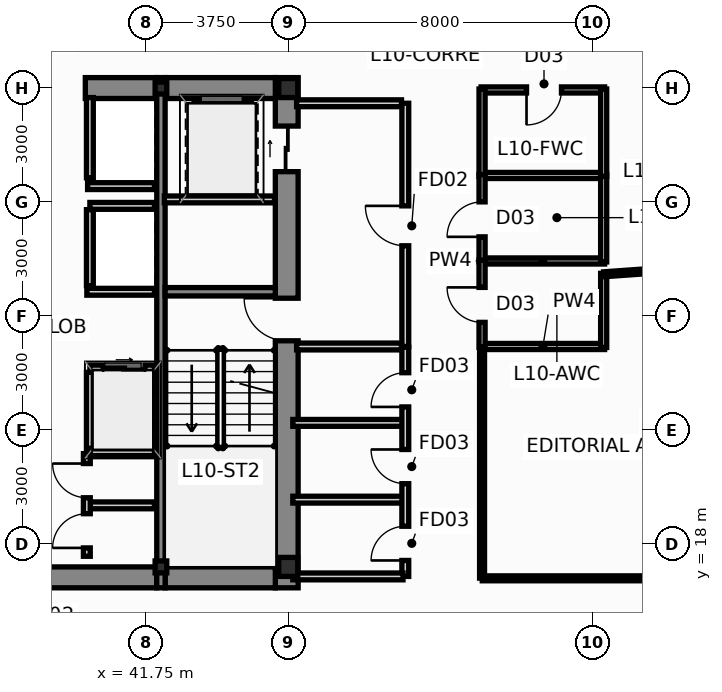
"""IFC4 building model, lengths in metres.
Left out: names, types, materials, properties, quantities, classifications, styles, units other than length and angle.
Written with IfcOpenShell. Run it as: python <this file> out.ifc"""

import sys

from ifc_helpers import new_model, si_unit, direction, frame, frame_2d, origin, origin_2d, place, context, subcontext, project, spatial, rectangle, i_section, extrude, source, transform, mapped, element, fill, save


model = new_model("IFC4")
c1 = context("Model", 3, precision=1e-05, world=origin(), true_north=direction((0.0, 1.0)))
c2 = subcontext(c1, "Body", "Model", "MODEL_VIEW")
j1 = project(units=[si_unit("LENGTHUNIT", "METRE"), si_unit("PLANEANGLEUNIT", "RADIAN")], contexts=[c1])
p1 = place(None, origin())
s1 = spatial("IfcSite", under=j1, at=p1, CompositionType="ELEMENT")
p2 = place(p1, origin())
s2 = spatial("IfcBuilding", under=s1, at=p2, CompositionType="ELEMENT")
p3 = place(p2, frame((0.0, 0.0, 42.2)))
s3 = spatial("IfcBuildingStorey", under=s2, at=p3, CompositionType="ELEMENT", Elevation=42.2)
m1 = source(origin(), c2, "Body", "SweptSolid", [
    extrude(i_section(OverallWidth=0.5, OverallDepth=0.5, WebThickness=0.028, FlangeThickness=0.04, at=origin_2d()), origin(), (0.0, 0.0, 1.0), 3.65),
])
for number, where, z_axis, x_axis in (
    (1, (45.5, 17.4, 0.0), (0.0, 0.0, 1.0), (1.0, 0.0, 0.0)),
    (2, (45.5, 30.0, 0.0), (0.0, 0.0, 1.0), (1.0, 0.0, 0.0)),
):
    element("IfcColumn", number, at=place(p3, frame(where, z_axis=z_axis, x_axis=x_axis)), inside=s3, PredefinedType="COLUMN", context=c2, shape_type="MappedRepresentation", body=[
        mapped(m1, transform((0.0, 0.0, 0.0), scale=1.0)),
    ])
m2 = source(origin(), c2, "Body", "SweptSolid", [
    extrude(i_section(OverallWidth=0.307, OverallDepth=0.315, WebThickness=0.012, FlangeThickness=0.019, at=origin_2d()), origin(), (0.0, 0.0, 1.0), 3.65),
])
for number, where, z_axis, x_axis in (
    (3, (42.15, 17.4, 0.0), (0.0, 0.0, 1.0), (1.0, 0.0, 0.0)),
    (4, (42.15, 30.0, 0.0), (0.0, 0.0, 1.0), (1.0, 0.0, 0.0)),
):
    element("IfcColumn", number, at=place(p3, frame(where, z_axis=z_axis, x_axis=x_axis)), inside=s3, PredefinedType="COLUMN", context=c2, shape_type="MappedRepresentation", body=[
        mapped(m2, transform((0.0, 0.0, 0.0), scale=1.0)),
    ])
p4 = place(p3, frame((45.46, 16.85, 0.0), z_axis=(0.0, 0.0, 1.0), x_axis=(0.0, 1.0, 0.0)))
e5 = element("IfcWall", 5, at=p4, inside=s3, PredefinedType="SHEAR", context=c2, shape_type="SweptSolid", body=[
    extrude(rectangle(XDim=13.425, YDim=0.6, at=frame_2d((6.712, 0.0))), origin(), (0.0, 0.0, 1.0), 3.65),
])
p5 = place(p4, frame((6.5, 0.0, 0.0)))
e6 = element("IfcOpeningElement", 6, at=p5, cuts=e5, PredefinedType="OPENING", context=c2, shape_type="SweptSolid", body=[
    extrude(rectangle(XDim=1.12, YDim=2.15, at=frame_2d((0.56, 1.075))), frame((0.0, 0.312, 0.0), z_axis=(0.0, -1.0, 0.0), x_axis=(1.0, 0.0, 0.0)), (0.0, 0.0, 1.0), 0.624),
])
p6 = place(p4, frame((10.95, 0.0, 0.0)))
e7 = element("IfcOpeningElement", 7, at=p6, cuts=e5, PredefinedType="OPENING", context=c2, shape_type="SweptSolid", body=[
    extrude(rectangle(XDim=1.2, YDim=2.2, at=frame_2d((0.6, 1.1))), frame((0.0, 0.312, 0.0), z_axis=(0.0, -1.0, 0.0), x_axis=(1.0, 0.0, 0.0)), (0.0, 0.0, 1.0), 0.624),
])
p7 = place(p3, frame((33.96, 17.125, 0.0), z_axis=(0.0, 0.0, 1.0), x_axis=(1.0, 0.0, 0.0)))
e8 = element("IfcWall", 8, at=p7, inside=s3, PredefinedType="SHEAR", context=c2, shape_type="SweptSolid", body=[
    extrude(rectangle(XDim=8.08, YDim=0.55, at=frame_2d((4.04, 0.0))), origin(), (0.0, 0.0, 1.0), 3.65),
])
p8 = place(p3, frame((42.26, 17.125, 0.0), z_axis=(0.0, 0.0, 1.0), x_axis=(1.0, 0.0, 0.0)))
e9 = element("IfcWall", 9, at=p8, inside=s3, PredefinedType="SHEAR", context=c2, shape_type="SweptSolid", body=[
    extrude(rectangle(XDim=2.9, YDim=0.55, at=frame_2d((1.45, 0.0))), origin(), (0.0, 0.0, 1.0), 3.65),
])
p9 = place(p3, frame((40.16, 30.0, 0.0), z_axis=(0.0, 0.0, 1.0), x_axis=(1.0, 0.0, 0.0)))
e10 = element("IfcWall", 10, at=p9, inside=s3, PredefinedType="SHEAR", context=c2, shape_type="SweptSolid", body=[
    extrude(rectangle(XDim=1.88, YDim=0.55, at=frame_2d((0.94, 0.0))), origin(), (0.0, 0.0, 1.0), 3.65),
])
p10 = place(p3, frame((42.26, 30.0, 0.0), z_axis=(0.0, 0.0, 1.0), x_axis=(1.0, 0.0, 0.0)))
e11 = element("IfcWall", 11, at=p10, inside=s3, PredefinedType="SHEAR", context=c2, shape_type="SweptSolid", body=[
    extrude(rectangle(XDim=2.9, YDim=0.55, at=frame_2d((1.45, 0.0))), origin(), (0.0, 0.0, 1.0), 3.65),
])
p11 = place(p3, frame((42.15, 16.85, 0.0), z_axis=(0.0, 0.0, 1.0), x_axis=(0.0, 1.0, 0.0)))
e12 = element("IfcWall", 12, at=p11, inside=s3, PredefinedType="SHEAR", context=c2, shape_type="SweptSolid", body=[
    extrude(rectangle(XDim=13.425, YDim=0.22, at=frame_2d((6.712, 0.0))), origin(), (0.0, 0.0, 1.0), 3.65),
])
p12 = place(p3, frame((42.26, 24.64, 0.0), z_axis=(0.0, 0.0, 1.0), x_axis=(1.0, 0.0, 0.0)))
e13 = element("IfcWall", 13, at=p12, inside=s3, PredefinedType="SHEAR", context=c2, shape_type="SweptSolid", body=[
    extrude(rectangle(XDim=2.9, YDim=0.22, at=frame_2d((1.45, 0.0))), origin(), (0.0, 0.0, 1.0), 3.65),
])
p13 = place(p3, frame((40.28, 22.62, 0.0), z_axis=(0.0, 0.0, 1.0), x_axis=(1.0, 0.0, 0.0)))
e14 = element("IfcWall", 14, at=p13, inside=s3, PredefinedType="PARTITIONING", context=c2, shape_type="SweptSolid", body=[
    extrude(rectangle(XDim=1.7, YDim=0.18, at=frame_2d((0.85, 0.0))), origin(), (0.0, 0.0, 1.0), 3.4),
])
p14 = place(p13, frame((0.35, 0.0, 0.0)))
e15 = element("IfcOpeningElement", 15, at=p14, cuts=e14, PredefinedType="OPENING", context=c2, shape_type="SweptSolid", body=[
    extrude(rectangle(XDim=1.1, YDim=2.2, at=frame_2d((0.55, 1.1))), frame((0.0, 0.102, 0.0), z_axis=(0.0, -1.0, 0.0), x_axis=(1.0, 0.0, 0.0)), (0.0, 0.0, 1.0), 0.204),
])
p15 = place(p3, frame((40.28, 20.52, 0.0), z_axis=(0.0, 0.0, 1.0), x_axis=(0.0, 1.0, 0.0)))
e16 = element("IfcWall", 16, at=p15, inside=s3, PredefinedType="PARTITIONING", context=c2, shape_type="SweptSolid", body=[
    extrude(rectangle(XDim=2.0, YDim=0.18, at=frame_2d((1.0, 0.0))), origin(), (0.0, 0.0, 1.0), 3.4),
])
p16 = place(p3, frame((40.28, 26.9, 0.0), z_axis=(0.0, 0.0, 1.0), x_axis=(1.0, 0.0, 0.0)))
e17 = element("IfcWall", 17, at=p16, inside=s3, PredefinedType="PARTITIONING", context=c2, shape_type="SweptSolid", body=[
    extrude(rectangle(XDim=1.7, YDim=0.18, at=frame_2d((0.85, 0.0))), origin(), (0.0, 0.0, 1.0), 3.4),
])
p17 = place(p3, frame((40.28, 24.8, 0.0), z_axis=(0.0, 0.0, 1.0), x_axis=(0.0, 1.0, 0.0)))
e18 = element("IfcWall", 18, at=p17, inside=s3, PredefinedType="PARTITIONING", context=c2, shape_type="SweptSolid", body=[
    extrude(rectangle(XDim=2.0, YDim=0.18, at=frame_2d((1.0, 0.0))), origin(), (0.0, 0.0, 1.0), 3.4),
])
p18 = place(p3, frame((40.2, 24.64, 0.0), z_axis=(0.0, 0.0, 1.0), x_axis=(1.0, 0.0, 0.0)))
e19 = element("IfcWall", 19, at=p18, inside=s3, PredefinedType="PARTITIONING", context=c2, shape_type="SweptSolid", body=[
    extrude(rectangle(XDim=1.78, YDim=0.18, at=frame_2d((0.89, 0.0))), origin(), (0.0, 0.0, 1.0), 3.4),
])
p19 = place(p3, frame((40.22, 27.42, 0.0), z_axis=(0.0, 0.0, 1.0), x_axis=(1.0, 0.0, 0.0)))
e20 = element("IfcWall", 20, at=p19, inside=s3, PredefinedType="PARTITIONING", context=c2, shape_type="SweptSolid", body=[
    extrude(rectangle(XDim=1.76, YDim=0.18, at=frame_2d((0.88, 0.0))), origin(), (0.0, 0.0, 1.0), 3.4),
])
p20 = place(p3, frame((40.28, 27.64, 0.0), z_axis=(0.0, 0.0, 1.0), x_axis=(0.0, 1.0, 0.0)))
e21 = element("IfcWall", 21, at=p20, inside=s3, PredefinedType="PARTITIONING", context=c2, shape_type="SweptSolid", body=[
    extrude(rectangle(XDim=2.11, YDim=0.18, at=frame_2d((1.055, 0.0))), origin(), (0.0, 0.0, 1.0), 3.4),
])
p21 = place(p3, frame((48.58, 23.2, 0.0), z_axis=(0.0, 0.0, 1.0), x_axis=(0.0, 1.0, 0.0)))
e22 = element("IfcWall", 22, at=p21, inside=s3, PredefinedType="PARTITIONING", context=c2, shape_type="SweptSolid", body=[
    extrude(rectangle(XDim=6.4, YDim=0.18, at=frame_2d((3.2, 0.0))), origin(), (0.0, 0.0, 1.0), 3.4),
])
p22 = place(p21, frame((2.65, 0.0, 0.0)))
e23 = element("IfcOpeningElement", 23, at=p22, cuts=e22, PredefinedType="OPENING", context=c2, shape_type="SweptSolid", body=[
    extrude(rectangle(XDim=1.05, YDim=2.15, at=frame_2d((0.525, 1.075))), frame((0.0, 0.102, 0.0), z_axis=(0.0, -1.0, 0.0), x_axis=(1.0, 0.0, 0.0)), (0.0, 0.0, 1.0), 0.204),
])
p23 = place(p3, frame((45.72, 23.2, 0.0), z_axis=(0.0, 0.0, 1.0), x_axis=(1.0, 0.0, 0.0)))
e24 = element("IfcWall", 24, at=p23, inside=s3, PredefinedType="PARTITIONING", context=c2, shape_type="SweptSolid", body=[
    extrude(rectangle(XDim=2.76, YDim=0.18, at=frame_2d((1.38, 0.0))), origin(), (0.0, 0.0, 1.0), 3.4),
])
p24 = place(p3, frame((45.72, 29.6, 0.0), z_axis=(0.0, 0.0, 1.0), x_axis=(1.0, 0.0, 0.0)))
e25 = element("IfcWall", 25, at=p24, inside=s3, PredefinedType="PARTITIONING", context=c2, shape_type="SweptSolid", body=[
    extrude(rectangle(XDim=2.76, YDim=0.18, at=frame_2d((1.38, 0.0))), origin(), (0.0, 0.0, 1.0), 2.783),
])
p25 = place(p3, frame((42.24, 27.07, 0.0), z_axis=(0.0, 0.0, 1.0), x_axis=(1.0, 0.0, 0.0)))
e26 = element("IfcWall", 26, at=p25, inside=s3, PredefinedType="PARTITIONING", context=c2, shape_type="SweptSolid", body=[
    extrude(rectangle(XDim=2.9, YDim=0.18, at=frame_2d((1.45, 0.0))), origin(), (0.0, 0.0, 1.0), 3.4),
])
p26 = place(p3, frame((40.22, 20.42, 0.0), z_axis=(0.0, 0.0, 1.0), x_axis=(1.0, 0.0, 0.0)))
e27 = element("IfcWall", 27, at=p26, inside=s3, PredefinedType="PARTITIONING", context=c2, shape_type="SweptSolid", body=[
    extrude(rectangle(XDim=1.76, YDim=0.18, at=frame_2d((0.88, 0.0))), origin(), (0.0, 0.0, 1.0), 3.4),
])
p27 = place(p3, frame((40.28, 19.02, 0.0), z_axis=(0.0, 0.0, 1.0), x_axis=(1.0, 0.0, 0.0)))
e28 = element("IfcWall", 28, at=p27, inside=s3, PredefinedType="PARTITIONING", context=c2, shape_type="SweptSolid", body=[
    extrude(rectangle(XDim=1.7, YDim=0.18, at=frame_2d((0.85, 0.0))), origin(), (0.0, 0.0, 1.0), 3.4),
])
p28 = place(p3, frame((40.2, 17.68, 0.0), z_axis=(0.0, 0.0, 1.0), x_axis=(0.0, 1.0, 0.0)))
e29 = element("IfcWall", 29, at=p28, inside=s3, PredefinedType="PARTITIONING", context=c2, shape_type="SweptSolid", body=[
    extrude(rectangle(XDim=2.7, YDim=0.18, at=frame_2d((1.35, 0.0))), origin(), (0.0, 0.0, 1.0), 3.4),
])
p29 = place(p28, frame((0.22, 0.0, 0.0)))
e30 = element("IfcOpeningElement", 30, at=p29, cuts=e29, PredefinedType="OPENING", context=c2, shape_type="SweptSolid", body=[
    extrude(rectangle(XDim=0.9, YDim=2.1, at=frame_2d((0.45, 1.05))), frame((0.0, 0.102, 0.0), z_axis=(0.0, -1.0, 0.0), x_axis=(1.0, 0.0, 0.0)), (0.0, 0.0, 1.0), 0.204),
])
p30 = place(p28, frame((1.54, 0.0, 0.0)))
e31 = element("IfcOpeningElement", 31, at=p30, cuts=e29, PredefinedType="OPENING", context=c2, shape_type="SweptSolid", body=[
    extrude(rectangle(XDim=0.9, YDim=2.1, at=frame_2d((0.45, 1.05))), frame((0.0, 0.102, 0.0), z_axis=(0.0, -1.0, 0.0), x_axis=(1.0, 0.0, 0.0)), (0.0, 0.0, 1.0), 0.204),
])
for number, where, z_axis, x_axis in (
    (32, (45.62, 19.17, 0.0), (0.0, 0.0, 1.0), (1.0, 0.0, 0.0)),
    (33, (45.62, 21.19, 0.0), (0.0, 0.0, 1.0), (1.0, 0.0, 0.0)),
):
    element("IfcWall", number, at=place(p3, frame(where, z_axis=z_axis, x_axis=x_axis)), inside=s3, PredefinedType="PARTITIONING", context=c2, shape_type="SweptSolid", body=[
        extrude(rectangle(XDim=2.9, YDim=0.18, at=frame_2d((1.45, 0.0))), origin(), (0.0, 0.0, 1.0), 3.4),
    ])
p31 = place(p3, frame((48.58, 17.15, 0.0), z_axis=(0.0, 0.0, 1.0), x_axis=(0.0, 1.0, 0.0)))
e34 = element("IfcWall", 34, at=p31, inside=s3, PredefinedType="PARTITIONING", context=c2, shape_type="SweptSolid", body=[
    extrude(rectangle(XDim=6.03, YDim=0.18, at=frame_2d((3.015, 0.0))), origin(), (0.0, 0.0, 1.0), 3.026),
])
p32 = place(p31, frame((0.42, 0.0, 0.0)))
e35 = element("IfcOpeningElement", 35, at=p32, cuts=e34, PredefinedType="OPENING", context=c2, shape_type="SweptSolid", body=[
    extrude(rectangle(XDim=0.9, YDim=2.1, at=frame_2d((0.45, 1.05))), frame((0.0, 0.102, 0.0), z_axis=(0.0, -1.0, 0.0), x_axis=(1.0, 0.0, 0.0)), (0.0, 0.0, 1.0), 0.204),
])
p33 = place(p31, frame((2.44, 0.0, 0.0)))
e36 = element("IfcOpeningElement", 36, at=p33, cuts=e34, PredefinedType="OPENING", context=c2, shape_type="SweptSolid", body=[
    extrude(rectangle(XDim=0.9, YDim=2.1, at=frame_2d((0.45, 1.05))), frame((0.0, 0.102, 0.0), z_axis=(0.0, -1.0, 0.0), x_axis=(1.0, 0.0, 0.0)), (0.0, 0.0, 1.0), 0.204),
])
p34 = place(p31, frame((4.46, 0.0, 0.0)))
e37 = element("IfcOpeningElement", 37, at=p34, cuts=e34, PredefinedType="OPENING", context=c2, shape_type="SweptSolid", body=[
    extrude(rectangle(XDim=0.9, YDim=2.1, at=frame_2d((0.45, 1.05))), frame((0.0, 0.102, 0.0), z_axis=(0.0, -1.0, 0.0), x_axis=(1.0, 0.0, 0.0)), (0.0, 0.0, 1.0), 0.204),
])
p35 = place(p3, frame((45.62, 17.15, 0.0), z_axis=(0.0, 0.0, 1.0), x_axis=(1.0, 0.0, 0.0)))
e38 = element("IfcWall", 38, at=p35, inside=s3, PredefinedType="PARTITIONING", context=c2, shape_type="SweptSolid", body=[
    extrude(rectangle(XDim=2.9, YDim=0.18, at=frame_2d((1.45, 0.0))), origin(), (0.0, 0.0, 1.0), 2.783),
])
for number, where, z_axis, x_axis in (
    (39, (50.575, 23.2, 0.0), (0.0, 0.0, 1.0), (1.0, 0.0, 0.0)),
    (40, (50.575, 25.45, 0.0), (0.0, 0.0, 1.0), (1.0, 0.0, 0.0)),
    (41, (50.575, 27.7, 0.0), (0.0, 0.0, 1.0), (1.0, 0.0, 0.0)),
):
    element("IfcWall", number, at=place(p3, frame(where, z_axis=z_axis, x_axis=x_axis)), inside=s3, PredefinedType="PLUMBINGWALL", context=c2, shape_type="SweptSolid", body=[
        extrude(rectangle(XDim=3.25, YDim=0.16, at=frame_2d((1.625, 0.0))), origin(), (0.0, 0.0, 1.0), 3.4),
    ])
p36 = place(p3, frame((53.825, 29.95, 0.0), z_axis=(0.0, 0.0, 1.0), x_axis=(-1.0, 0.0, 0.0)))
e42 = element("IfcWall", 42, at=p36, inside=s3, PredefinedType="PLUMBINGWALL", context=c2, shape_type="SweptSolid", body=[
    extrude(rectangle(XDim=3.25, YDim=0.16, at=frame_2d((1.625, 0.0))), origin(), (0.0, 0.0, 1.0), 2.783),
])
p37 = place(p36, frame((1.135, 0.0, 0.0)))
e43 = element("IfcOpeningElement", 43, at=p37, cuts=e42, PredefinedType="OPENING", context=c2, shape_type="SweptSolid", body=[
    extrude(rectangle(XDim=0.92, YDim=2.1, at=frame_2d((0.46, 1.05))), frame((0.0, 0.092, 0.0), z_axis=(0.0, -1.0, 0.0), x_axis=(1.0, 0.0, 0.0)), (0.0, 0.0, 1.0), 0.184),
])
p38 = place(p3, frame((50.6, 27.675, 0.0), z_axis=(0.0, 0.0, 1.0), x_axis=(0.0, 1.0, 0.0)))
e44 = element("IfcWall", 44, at=p38, inside=s3, PredefinedType="PLUMBINGWALL", context=c2, shape_type="SweptSolid", body=[
    extrude(rectangle(XDim=2.3, YDim=0.16, at=frame_2d((1.15, 0.0))), origin(), (0.0, 0.0, 1.0), 3.4),
])
p39 = place(p3, frame((50.6, 25.425, 0.0), z_axis=(0.0, 0.0, 1.0), x_axis=(0.0, 1.0, 0.0)))
e45 = element("IfcWall", 45, at=p39, inside=s3, PredefinedType="PLUMBINGWALL", context=c2, shape_type="SweptSolid", body=[
    extrude(rectangle(XDim=2.3, YDim=0.16, at=frame_2d((1.15, 0.0))), origin(), (0.0, 0.0, 1.0), 3.4),
])
p40 = place(p39, frame((0.66, 0.0, 0.0)))
e46 = element("IfcOpeningElement", 46, at=p40, cuts=e45, PredefinedType="OPENING", context=c2, shape_type="SweptSolid", body=[
    extrude(rectangle(XDim=0.92, YDim=2.1, at=frame_2d((0.46, 1.05))), frame((0.0, 0.092, 0.0), z_axis=(0.0, -1.0, 0.0), x_axis=(1.0, 0.0, 0.0)), (0.0, 0.0, 1.0), 0.184),
])
p41 = place(p3, frame((50.6, 23.175, 0.0), z_axis=(0.0, 0.0, 1.0), x_axis=(0.0, 1.0, 0.0)))
e47 = element("IfcWall", 47, at=p41, inside=s3, PredefinedType="PLUMBINGWALL", context=c2, shape_type="SweptSolid", body=[
    extrude(rectangle(XDim=2.3, YDim=0.16, at=frame_2d((1.15, 0.0))), origin(), (0.0, 0.0, 1.0), 3.026),
])
p42 = place(p41, frame((0.66, 0.0, 0.0)))
e48 = element("IfcOpeningElement", 48, at=p42, cuts=e47, PredefinedType="OPENING", context=c2, shape_type="SweptSolid", body=[
    extrude(rectangle(XDim=0.92, YDim=2.1, at=frame_2d((0.46, 1.05))), frame((0.0, 0.092, 0.0), z_axis=(0.0, -1.0, 0.0), x_axis=(1.0, 0.0, 0.0)), (0.0, 0.0, 1.0), 0.184),
])
for number, where, z_axis, x_axis in (
    (49, (53.8, 25.425, 0.0), (0.0, 0.0, 1.0), (0.0, 1.0, 0.0)),
    (50, (53.8, 27.675, 0.0), (0.0, 0.0, 1.0), (0.0, 1.0, 0.0)),
):
    element("IfcWall", number, at=place(p3, frame(where, z_axis=z_axis, x_axis=x_axis)), inside=s3, PredefinedType="PLUMBINGWALL", context=c2, shape_type="SweptSolid", body=[
        extrude(rectangle(XDim=2.3, YDim=0.16, at=frame_2d((1.15, 0.0))), origin(), (0.0, 0.0, 1.0), 3.026),
    ])
p43 = place(p3, frame((53.8, 23.175, 0.0), z_axis=(0.0, 0.0, 1.0), x_axis=(0.0, 1.0, 0.0)))
e51 = element("IfcWall", 51, at=p43, inside=s3, PredefinedType="PLUMBINGWALL", context=c2, shape_type="SweptSolid", body=[
    extrude(rectangle(XDim=1.95, YDim=0.16, at=frame_2d((0.975, 0.0))), origin(), (0.0, 0.0, 1.0), 3.4),
])
p44 = place(p3, frame((64.094, 17.1, 0.0), z_axis=(0.0, 0.0, 1.0), x_axis=(-1.0, 0.0, 0.0)))
e52 = element("IfcWall", 52, at=p44, inside=s3, PredefinedType="PARTITIONING", context=c2, shape_type="SweptSolid", body=[
    extrude(rectangle(XDim=13.489, YDim=0.13, at=frame_2d((6.744, 0.0))), origin(), (0.0, 0.0, 1.0), 3.4),
])
p45 = place(p44, frame((6.318, 0.0, 0.0)))
e53 = element("IfcOpeningElement", 53, at=p45, cuts=e52, PredefinedType="OPENING", context=c2, shape_type="SweptSolid", body=[
    extrude(rectangle(XDim=0.96, YDim=2.15, at=frame_2d((0.48, 1.075))), frame((0.0, 0.077, 0.0), z_axis=(0.0, -1.0, 0.0), x_axis=(1.0, 0.0, 0.0)), (0.0, 0.0, 1.0), 0.154),
])
p46 = place(p3, frame((53.805, 25.1, 0.0), z_axis=(0.0, 0.0, 1.0), x_axis=(0.997470434993, 0.071082566886, 0.0)))
e54 = element("IfcWall", 54, at=p46, inside=s3, PredefinedType="PARTITIONING", context=c2, shape_type="SweptSolid", body=[
    extrude(rectangle(XDim=6.223, YDim=0.13, at=frame_2d((3.112, 0.0))), origin(), (0.0, 0.0, 1.0), 3.4),
])
p47 = place(p3, frame((50.6, 17.105, 0.0), z_axis=(0.0, 0.0, 1.0), x_axis=(0.0, 1.0, 0.0)))
e55 = element("IfcWall", 55, at=p47, inside=s3, PredefinedType="PARTITIONING", context=c2, shape_type="SweptSolid", body=[
    extrude(rectangle(XDim=6.09, YDim=0.13, at=frame_2d((3.045, 0.0))), origin(), (0.0, 0.0, 1.0), 3.026),
])
p48 = place(p5, origin())
e56 = element("IfcDoor", 56, at=p48, inside=s3, OperationType="SINGLE_SWING_RIGHT", PredefinedType="DOOR", context=c2, shape_type="SweptSolid", body=[
    extrude(rectangle(XDim=1.12, YDim=2.15, at=frame_2d((0.56, 1.075))), frame((0.0, 0.025, 0.0), z_axis=(0.0, -1.0, 0.0), x_axis=(1.0, 0.0, 0.0)), (0.0, 0.0, 1.0), 0.05),
])
fill(e6, e56)
p49 = place(p6, origin())
e57 = element("IfcDoor", 57, at=p49, inside=s3, OperationType="SLIDING_TO_RIGHT", PredefinedType="DOOR", context=c2, shape_type="SweptSolid", body=[
    extrude(rectangle(XDim=1.2, YDim=2.2, at=frame_2d((0.6, 1.1))), frame((0.0, 0.025, 0.0), z_axis=(0.0, -1.0, 0.0), x_axis=(1.0, 0.0, 0.0)), (0.0, 0.0, 1.0), 0.05),
])
fill(e7, e57)
p50 = place(p14, origin())
e58 = element("IfcDoor", 58, at=p50, inside=s3, OperationType="SLIDING_TO_LEFT", PredefinedType="DOOR", context=c2, shape_type="SweptSolid", body=[
    extrude(rectangle(XDim=1.1, YDim=2.2, at=frame_2d((0.55, 1.1))), frame((0.0, 0.025, 0.0), z_axis=(0.0, -1.0, 0.0), x_axis=(1.0, 0.0, 0.0)), (0.0, 0.0, 1.0), 0.05),
])
fill(e15, e58)
p51 = place(p22, origin())
e59 = element("IfcDoor", 59, at=p51, inside=s3, OperationType="SINGLE_SWING_RIGHT", PredefinedType="DOOR", context=c2, shape_type="SweptSolid", body=[
    extrude(rectangle(XDim=1.05, YDim=2.15, at=frame_2d((0.525, 1.075))), frame((0.0, 0.025, 0.0), z_axis=(0.0, -1.0, 0.0), x_axis=(1.0, 0.0, 0.0)), (0.0, 0.0, 1.0), 0.05),
])
fill(e23, e59)
p52 = place(p29, origin())
e60 = element("IfcDoor", 60, at=p52, inside=s3, OperationType="SINGLE_SWING_LEFT", PredefinedType="DOOR", context=c2, shape_type="SweptSolid", body=[
    extrude(rectangle(XDim=0.9, YDim=2.1, at=frame_2d((0.45, 1.05))), frame((0.0, 0.025, 0.0), z_axis=(0.0, -1.0, 0.0), x_axis=(1.0, 0.0, 0.0)), (0.0, 0.0, 1.0), 0.05),
])
fill(e30, e60)
p53 = place(p30, origin())
e61 = element("IfcDoor", 61, at=p53, inside=s3, OperationType="SINGLE_SWING_RIGHT", PredefinedType="DOOR", context=c2, shape_type="SweptSolid", body=[
    extrude(rectangle(XDim=0.9, YDim=2.1, at=frame_2d((0.45, 1.05))), frame((0.0, 0.025, 0.0), z_axis=(0.0, -1.0, 0.0), x_axis=(1.0, 0.0, 0.0)), (0.0, 0.0, 1.0), 0.05),
])
fill(e31, e61)
p54 = place(p32, origin())
e62 = element("IfcDoor", 62, at=p54, inside=s3, OperationType="SINGLE_SWING_LEFT", PredefinedType="DOOR", context=c2, shape_type="SweptSolid", body=[
    extrude(rectangle(XDim=0.9, YDim=2.1, at=frame_2d((0.45, 1.05))), frame((0.0, 0.025, 0.0), z_axis=(0.0, -1.0, 0.0), x_axis=(1.0, 0.0, 0.0)), (0.0, 0.0, 1.0), 0.05),
])
fill(e35, e62)
p55 = place(p33, origin())
e63 = element("IfcDoor", 63, at=p55, inside=s3, OperationType="SINGLE_SWING_RIGHT", PredefinedType="DOOR", context=c2, shape_type="SweptSolid", body=[
    extrude(rectangle(XDim=0.9, YDim=2.1, at=frame_2d((0.45, 1.05))), frame((0.0, 0.025, 0.0), z_axis=(0.0, -1.0, 0.0), x_axis=(1.0, 0.0, 0.0)), (0.0, 0.0, 1.0), 0.05),
])
fill(e36, e63)
p56 = place(p34, origin())
e64 = element("IfcDoor", 64, at=p56, inside=s3, OperationType="SINGLE_SWING_LEFT", PredefinedType="DOOR", context=c2, shape_type="SweptSolid", body=[
    extrude(rectangle(XDim=0.9, YDim=2.1, at=frame_2d((0.45, 1.05))), frame((0.0, 0.025, 0.0), z_axis=(0.0, -1.0, 0.0), x_axis=(1.0, 0.0, 0.0)), (0.0, 0.0, 1.0), 0.05),
])
fill(e37, e64)
p57 = place(p37, origin())
e65 = element("IfcDoor", 65, at=p57, inside=s3, OperationType="SINGLE_SWING_RIGHT", PredefinedType="DOOR", context=c2, shape_type="SweptSolid", body=[
    extrude(rectangle(XDim=0.92, YDim=2.1, at=frame_2d((0.46, 1.05))), frame((0.0, 0.025, 0.0), z_axis=(0.0, -1.0, 0.0), x_axis=(1.0, 0.0, 0.0)), (0.0, 0.0, 1.0), 0.05),
])
fill(e43, e65)
p58 = place(p40, origin())
e66 = element("IfcDoor", 66, at=p58, inside=s3, OperationType="SINGLE_SWING_LEFT", PredefinedType="DOOR", context=c2, shape_type="SweptSolid", body=[
    extrude(rectangle(XDim=0.92, YDim=2.1, at=frame_2d((0.46, 1.05))), frame((0.0, 0.025, 0.0), z_axis=(0.0, -1.0, 0.0), x_axis=(1.0, 0.0, 0.0)), (0.0, 0.0, 1.0), 0.05),
])
fill(e46, e66)
p59 = place(p42, origin())
e67 = element("IfcDoor", 67, at=p59, inside=s3, OperationType="SINGLE_SWING_RIGHT", PredefinedType="DOOR", context=c2, shape_type="SweptSolid", body=[
    extrude(rectangle(XDim=0.92, YDim=2.1, at=frame_2d((0.46, 1.05))), frame((0.0, 0.025, 0.0), z_axis=(0.0, -1.0, 0.0), x_axis=(1.0, 0.0, 0.0)), (0.0, 0.0, 1.0), 0.05),
])
fill(e48, e67)
save(model, sys.argv[1])
